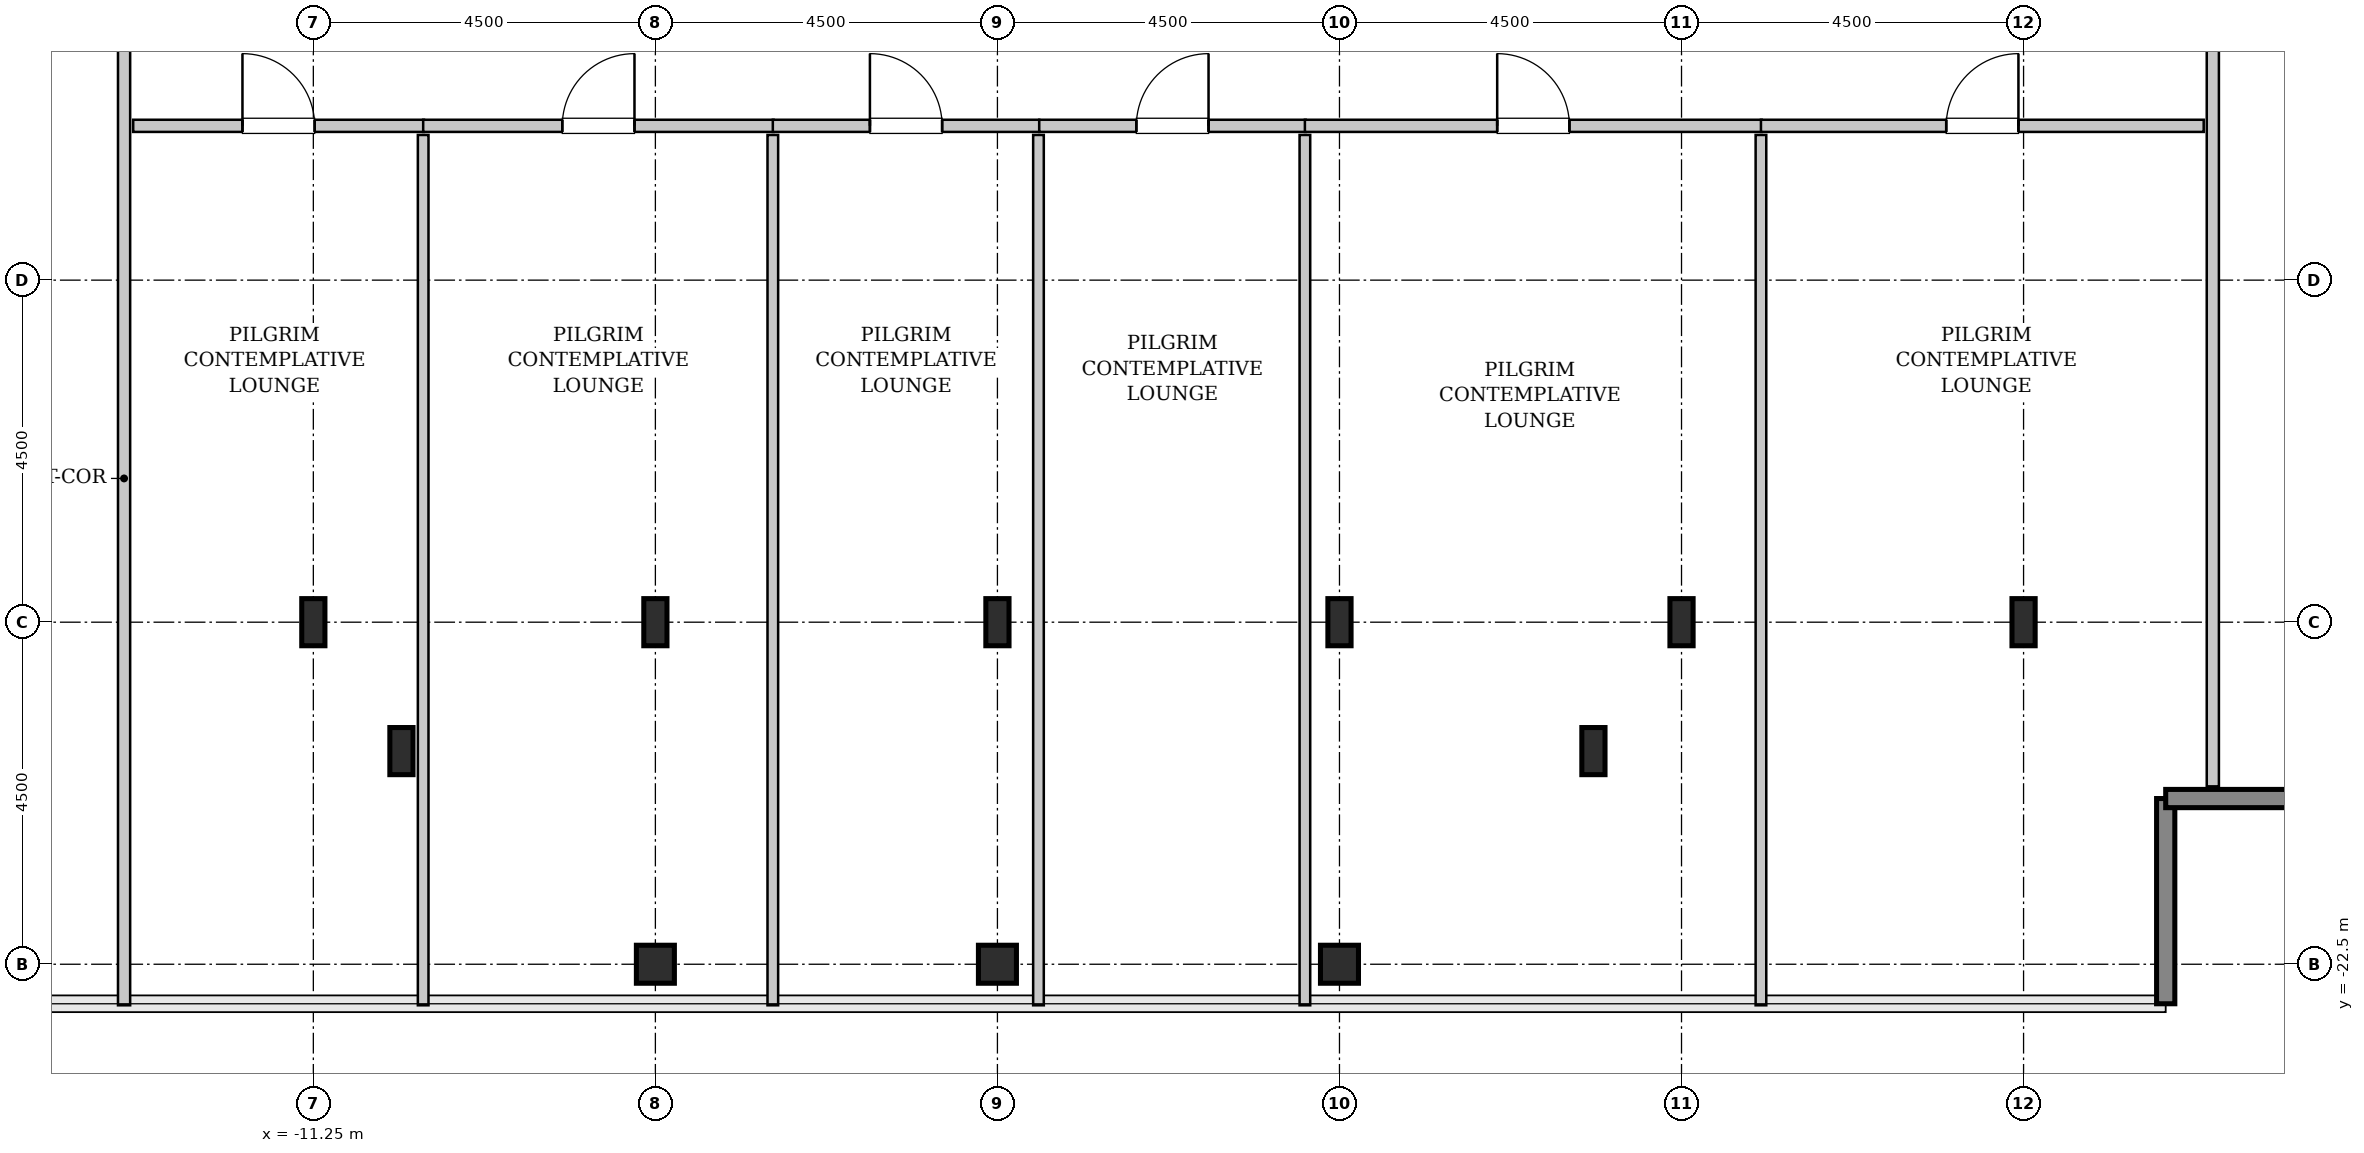
"""IFC4 building model, lengths in metres.
Left out: names, types, materials, properties, quantities, classifications, styles, units other than length and angle.
Written with IfcOpenShell. Run it as: python <this file> out.ifc"""

import sys

from ifc_helpers import new_model, si_unit, direction, frame, frame_2d, origin, origin_2d, place, context, subcontext, project, spatial, rectangle, hollow_rectangle, i_section, extrude, source, transform, mapped, element, fill, save


model = new_model("IFC4")
c1 = context("Model", 3, precision=1e-05, world=origin(), true_north=direction((0.0, 1.0)))
c2 = subcontext(c1, "Body", "Model", "MODEL_VIEW")
j1 = project(units=[si_unit("LENGTHUNIT", "METRE"), si_unit("PLANEANGLEUNIT", "RADIAN")], contexts=[c1])
p1 = place(None, origin())
s1 = spatial("IfcSite", under=j1, at=p1, CompositionType="ELEMENT")
p2 = place(p1, origin())
s2 = spatial("IfcBuilding", under=s1, at=p2, CompositionType="ELEMENT")
p3 = place(p2, frame((0.0, 0.0, 291.2)))
s3 = spatial("IfcBuildingStorey", under=s2, at=p3, CompositionType="ELEMENT", Elevation=291.2)
m1 = source(origin(), c2, "Body", "SweptSolid", [
    extrude(i_section(OverallWidth=0.305, OverallDepth=0.62, WebThickness=0.021, FlangeThickness=0.04, FilletRadius=0.027, at=origin_2d()), origin(), (0.0, 0.0, 1.0), 3.8),
])
for number, where, z_axis, x_axis in (
    (1, (-11.25, -18.0, 0.0), (0.0, 0.0, 1.0), (1.0, 0.0, 0.0)),
    (2, (-10.091, -19.696, 0.0), (0.0, 0.0, 1.0), (1.0, 0.0, 0.0)),
):
    element("IfcColumn", number, at=place(p3, frame(where, z_axis=z_axis, x_axis=x_axis)), inside=s3, PredefinedType="COLUMN", context=c2, shape_type="MappedRepresentation", body=[
        mapped(m1, transform((0.0, 0.0, 0.0), x_axis=(1.0, 0.0, 0.0), y_axis=(0.0, 1.0, 0.0), z_axis=(0.0, 0.0, 1.0), scale=1.0)),
    ])
m2 = source(origin(), c2, "Body", "SweptSolid", [
    extrude(hollow_rectangle(XDim=0.5, YDim=0.5, WallThickness=0.025, InnerFilletRadius=0.025, OuterFilletRadius=0.05, at=origin_2d()), origin(), (0.0, 0.0, 1.0), 3.8),
])
p4 = place(p3, frame((-6.75, -22.5, 0.0), z_axis=(0.0, 0.0, 1.0), x_axis=(1.0, 0.0, 0.0)))
e3 = element("IfcColumn", 3, at=p4, inside=s3, PredefinedType="COLUMN", context=c2, shape_type="MappedRepresentation", body=[
    mapped(m2, transform((0.0, 0.0, 0.0), x_axis=(1.0, 0.0, 0.0), y_axis=(0.0, 1.0, 0.0), z_axis=(0.0, 0.0, 1.0), scale=1.0)),
])
p5 = place(p3, frame((-6.75, -18.0, 0.0), z_axis=(0.0, 0.0, 1.0), x_axis=(1.0, 0.0, 0.0)))
e4 = element("IfcColumn", 4, at=p5, inside=s3, PredefinedType="COLUMN", context=c2, shape_type="MappedRepresentation", body=[
    mapped(m1, transform((0.0, 0.0, 0.0), x_axis=(1.0, 0.0, 0.0), y_axis=(0.0, 1.0, 0.0), z_axis=(0.0, 0.0, 1.0), scale=1.0)),
])
p6 = place(p3, frame((-2.25, -22.5, 0.0), z_axis=(0.0, 0.0, 1.0), x_axis=(1.0, 0.0, 0.0)))
e5 = element("IfcColumn", 5, at=p6, inside=s3, PredefinedType="COLUMN", context=c2, shape_type="MappedRepresentation", body=[
    mapped(m2, transform((0.0, 0.0, 0.0), x_axis=(1.0, 0.0, 0.0), y_axis=(0.0, 1.0, 0.0), z_axis=(0.0, 0.0, 1.0), scale=1.0)),
])
p7 = place(p3, frame((-2.25, -18.0, 0.0), z_axis=(0.0, 0.0, 1.0), x_axis=(1.0, 0.0, 0.0)))
e6 = element("IfcColumn", 6, at=p7, inside=s3, PredefinedType="COLUMN", context=c2, shape_type="MappedRepresentation", body=[
    mapped(m1, transform((0.0, 0.0, 0.0), x_axis=(1.0, 0.0, 0.0), y_axis=(0.0, 1.0, 0.0), z_axis=(0.0, 0.0, 1.0), scale=1.0)),
])
p8 = place(p3, frame((2.25, -22.5, 0.0), z_axis=(0.0, 0.0, 1.0), x_axis=(1.0, 0.0, 0.0)))
e7 = element("IfcColumn", 7, at=p8, inside=s3, PredefinedType="COLUMN", context=c2, shape_type="MappedRepresentation", body=[
    mapped(m2, transform((0.0, 0.0, 0.0), x_axis=(1.0, 0.0, 0.0), y_axis=(0.0, 1.0, 0.0), z_axis=(0.0, 0.0, 1.0), scale=1.0)),
])
for number, where, z_axis, x_axis in (
    (8, (2.25, -18.0, 0.0), (0.0, 0.0, 1.0), (1.0, 0.0, 0.0)),
    (9, (5.591, -19.696, 0.0), (0.0, 0.0, 1.0), (1.0, 0.0, 0.0)),
    (10, (6.75, -18.0, 0.0), (0.0, 0.0, 1.0), (1.0, 0.0, 0.0)),
    (11, (11.25, -18.0, 0.0), (0.0, 0.0, 1.0), (1.0, 0.0, 0.0)),
):
    element("IfcColumn", number, at=place(p3, frame(where, z_axis=z_axis, x_axis=x_axis)), inside=s3, PredefinedType="COLUMN", context=c2, shape_type="MappedRepresentation", body=[
        mapped(m1, transform((0.0, 0.0, 0.0), x_axis=(1.0, 0.0, 0.0), y_axis=(0.0, 1.0, 0.0), z_axis=(0.0, 0.0, 1.0), scale=1.0)),
    ])
m3 = source(origin(), c2, "Body", "SweptSolid", [
    extrude(rectangle(XDim=2.7, YDim=0.24, at=frame_2d((1.35, 0.0))), origin(), (0.0, 0.0, 1.0), 3.55),
])
for number, where, z_axis, x_axis in (
    (12, (13.12, -23.02, 0.0), (0.0, 0.0, 1.0), (0.0, 1.0, 0.0)),
    (13, (13.12, -20.32, 0.0), (0.0, 0.0, 1.0), (1.0, 0.0, 0.0)),
):
    element("IfcWall", number, at=place(p3, frame(where, z_axis=z_axis, x_axis=x_axis)), inside=s3, PredefinedType="SHEAR", context=c2, shape_type="MappedRepresentation", body=[
        mapped(m3, transform((0.0, 0.0, 0.0), x_axis=(1.0, 0.0, 0.0), y_axis=(0.0, 1.0, 0.0), z_axis=(0.0, 0.0, 1.0), scale=1.0)),
    ])
m4 = source(origin(), c2, "Body", "SweptSolid", [
    extrude(rectangle(XDim=17.045, YDim=0.16, at=frame_2d((8.522, 0.0))), origin(), (0.0, 0.0, 1.0), 3.535),
])
p9 = place(p3, frame((-13.74, -23.04, 0.0), z_axis=(0.0, 0.0, 1.0), x_axis=(0.0, 1.0, 0.0)))
e14 = element("IfcWall", 14, at=p9, inside=s3, PredefinedType="PARTITIONING", context=c2, shape_type="MappedRepresentation", body=[
    mapped(m4, transform((0.0, 0.0, 0.0), x_axis=(1.0, 0.0, 0.0), y_axis=(0.0, 1.0, 0.0), z_axis=(0.0, 0.0, 1.0), scale=1.0)),
])
p10 = place(p9, frame((13.812, 0.0, 0.0)))
e15 = element("IfcOpeningElement", 15, at=p10, cuts=e14, PredefinedType="OPENING", context=c2, shape_type="SweptSolid", body=[
    extrude(rectangle(XDim=0.95, YDim=2.1, at=frame_2d((0.475, 1.05))), frame((0.0, 0.09, 0.0), z_axis=(0.0, -1.0, 0.0), x_axis=(1.0, 0.0, 0.0)), (0.0, 0.0, 1.0), 0.18),
])
m5 = source(origin(), c2, "Body", "SweptSolid", [
    extrude(rectangle(XDim=11.665, YDim=0.16, at=frame_2d((5.833, 0.0))), origin(), (0.0, 0.0, 1.0), 3.535),
])
p11 = place(p3, frame((13.74, -20.16, 0.0), z_axis=(0.0, 0.0, 1.0), x_axis=(0.0, 1.0, 0.0)))
e16 = element("IfcWall", 16, at=p11, inside=s3, PredefinedType="PARTITIONING", context=c2, shape_type="MappedRepresentation", body=[
    mapped(m5, transform((0.0, 0.0, 0.0), x_axis=(1.0, 0.0, 0.0), y_axis=(0.0, 1.0, 0.0), z_axis=(0.0, 0.0, 1.0), scale=1.0)),
])
p12 = place(p11, frame((9.683, 0.0, 0.0)))
e17 = element("IfcOpeningElement", 17, at=p12, cuts=e16, PredefinedType="OPENING", context=c2, shape_type="SweptSolid", body=[
    extrude(rectangle(XDim=0.95, YDim=2.1, at=frame_2d((0.475, 1.05))), frame((0.0, 0.09, 0.0), z_axis=(0.0, -1.0, 0.0), x_axis=(1.0, 0.0, 0.0)), (0.0, 0.0, 1.0), 0.18),
])
m6 = source(origin(), c2, "Body", "SweptSolid", [
    extrude(rectangle(XDim=3.825, YDim=0.16, at=frame_2d((1.913, 0.0))), origin(), (0.0, 0.0, 1.0), 3.535),
])
p13 = place(p3, frame((-13.62, -11.47, 0.0), z_axis=(0.0, 0.0, 1.0), x_axis=(1.0, 0.0, 0.0)))
e18 = element("IfcWall", 18, at=p13, inside=s3, PredefinedType="PARTITIONING", context=c2, shape_type="MappedRepresentation", body=[
    mapped(m6, transform((0.0, 0.0, 0.0), x_axis=(1.0, 0.0, 0.0), y_axis=(0.0, 1.0, 0.0), z_axis=(0.0, 0.0, 1.0), scale=1.0)),
])
p14 = place(p13, frame((1.438, 0.0, 0.0)))
e19 = element("IfcOpeningElement", 19, at=p14, cuts=e18, PredefinedType="OPENING", context=c2, shape_type="SweptSolid", body=[
    extrude(rectangle(XDim=0.95, YDim=2.1, at=frame_2d((0.475, 1.05))), frame((0.0, 0.09, 0.0), z_axis=(0.0, -1.0, 0.0), x_axis=(1.0, 0.0, 0.0)), (0.0, 0.0, 1.0), 0.18),
])
m7 = source(origin(), c2, "Body", "SweptSolid", [
    extrude(rectangle(XDim=11.45, YDim=0.14, at=frame_2d((5.725, 0.0))), origin(), (0.0, 0.0, 1.0), 3.535),
])
p15 = place(p3, frame((-9.805, -23.04, 0.0), z_axis=(0.0, 0.0, 1.0), x_axis=(0.0, 1.0, 0.0)))
e20 = element("IfcWall", 20, at=p15, inside=s3, PredefinedType="PARTITIONING", context=c2, shape_type="MappedRepresentation", body=[
    mapped(m7, transform((0.0, 0.0, 0.0), x_axis=(1.0, 0.0, 0.0), y_axis=(0.0, 1.0, 0.0), z_axis=(0.0, 0.0, 1.0), scale=1.0)),
])
m8 = source(origin(), c2, "Body", "SweptSolid", [
    extrude(rectangle(XDim=4.61, YDim=0.16, at=frame_2d((2.305, 0.0))), origin(), (0.0, 0.0, 1.0), 3.535),
])
p16 = place(p3, frame((-9.805, -11.47, 0.0), z_axis=(0.0, 0.0, 1.0), x_axis=(1.0, 0.0, 0.0)))
e21 = element("IfcWall", 21, at=p16, inside=s3, PredefinedType="PARTITIONING", context=c2, shape_type="MappedRepresentation", body=[
    mapped(m8, transform((0.0, 0.0, 0.0), x_axis=(1.0, 0.0, 0.0), y_axis=(0.0, 1.0, 0.0), z_axis=(0.0, 0.0, 1.0), scale=1.0)),
])
p17 = place(p16, frame((1.83, 0.0, 0.0)))
e22 = element("IfcOpeningElement", 22, at=p17, cuts=e21, PredefinedType="OPENING", context=c2, shape_type="SweptSolid", body=[
    extrude(rectangle(XDim=0.95, YDim=2.1, at=frame_2d((0.475, 1.05))), frame((0.0, 0.09, 0.0), z_axis=(0.0, -1.0, 0.0), x_axis=(1.0, 0.0, 0.0)), (0.0, 0.0, 1.0), 0.18),
])
p18 = place(p3, frame((-5.205, -23.04, 0.0), z_axis=(0.0, 0.0, 1.0), x_axis=(0.0, 1.0, 0.0)))
e23 = element("IfcWall", 23, at=p18, inside=s3, PredefinedType="PARTITIONING", context=c2, shape_type="MappedRepresentation", body=[
    mapped(m7, transform((0.0, 0.0, 0.0), x_axis=(1.0, 0.0, 0.0), y_axis=(0.0, 1.0, 0.0), z_axis=(0.0, 0.0, 1.0), scale=1.0)),
])
m9 = source(origin(), c2, "Body", "SweptSolid", [
    extrude(rectangle(XDim=3.505, YDim=0.16, at=frame_2d((1.752, 0.0))), origin(), (0.0, 0.0, 1.0), 3.535),
])
p19 = place(p3, frame((-5.205, -11.47, 0.0), z_axis=(0.0, 0.0, 1.0), x_axis=(1.0, 0.0, 0.0)))
e24 = element("IfcWall", 24, at=p19, inside=s3, PredefinedType="PARTITIONING", context=c2, shape_type="MappedRepresentation", body=[
    mapped(m9, transform((0.0, 0.0, 0.0), x_axis=(1.0, 0.0, 0.0), y_axis=(0.0, 1.0, 0.0), z_axis=(0.0, 0.0, 1.0), scale=1.0)),
])
p20 = place(p19, frame((1.278, 0.0, 0.0)))
e25 = element("IfcOpeningElement", 25, at=p20, cuts=e24, PredefinedType="OPENING", context=c2, shape_type="SweptSolid", body=[
    extrude(rectangle(XDim=0.95, YDim=2.1, at=frame_2d((0.475, 1.05))), frame((0.0, 0.09, 0.0), z_axis=(0.0, -1.0, 0.0), x_axis=(1.0, 0.0, 0.0)), (0.0, 0.0, 1.0), 0.18),
])
p21 = place(p3, frame((-1.71, -23.04, 0.0), z_axis=(0.0, 0.0, 1.0), x_axis=(0.0, 1.0, 0.0)))
e26 = element("IfcWall", 26, at=p21, inside=s3, PredefinedType="PARTITIONING", context=c2, shape_type="MappedRepresentation", body=[
    mapped(m7, transform((0.0, 0.0, 0.0), x_axis=(1.0, 0.0, 0.0), y_axis=(0.0, 1.0, 0.0), z_axis=(0.0, 0.0, 1.0), scale=1.0)),
])
m10 = source(origin(), c2, "Body", "SweptSolid", [
    extrude(rectangle(XDim=3.505, YDim=0.16, at=frame_2d((1.752, 0.0))), origin(), (0.0, 0.0, 1.0), 3.535),
])
p22 = place(p3, frame((-1.7, -11.47, 0.0), z_axis=(0.0, 0.0, 1.0), x_axis=(1.0, 0.0, 0.0)))
e27 = element("IfcWall", 27, at=p22, inside=s3, PredefinedType="PARTITIONING", context=c2, shape_type="MappedRepresentation", body=[
    mapped(m10, transform((0.0, 0.0, 0.0), x_axis=(1.0, 0.0, 0.0), y_axis=(0.0, 1.0, 0.0), z_axis=(0.0, 0.0, 1.0), scale=1.0)),
])
p23 = place(p22, frame((1.278, 0.0, 0.0)))
e28 = element("IfcOpeningElement", 28, at=p23, cuts=e27, PredefinedType="OPENING", context=c2, shape_type="SweptSolid", body=[
    extrude(rectangle(XDim=0.95, YDim=2.1, at=frame_2d((0.475, 1.05))), frame((0.0, 0.09, 0.0), z_axis=(0.0, -1.0, 0.0), x_axis=(1.0, 0.0, 0.0)), (0.0, 0.0, 1.0), 0.18),
])
m11 = source(origin(), c2, "Body", "SweptSolid", [
    extrude(rectangle(XDim=11.45, YDim=0.14, at=frame_2d((5.725, 0.0))), origin(), (0.0, 0.0, 1.0), 2.925),
])
p24 = place(p3, frame((1.795, -23.04, 0.0), z_axis=(0.0, 0.0, 1.0), x_axis=(0.0, 1.0, 0.0)))
e29 = element("IfcWall", 29, at=p24, inside=s3, PredefinedType="PARTITIONING", context=c2, shape_type="MappedRepresentation", body=[
    mapped(m11, transform((0.0, 0.0, 0.0), x_axis=(1.0, 0.0, 0.0), y_axis=(0.0, 1.0, 0.0), z_axis=(0.0, 0.0, 1.0), scale=1.0)),
])
m12 = source(origin(), c2, "Body", "SweptSolid", [
    extrude(rectangle(XDim=6.01, YDim=0.16, at=frame_2d((3.005, 0.0))), origin(), (0.0, 0.0, 1.0), 3.535),
])
p25 = place(p3, frame((1.795, -11.47, 0.0), z_axis=(0.0, 0.0, 1.0), x_axis=(1.0, 0.0, 0.0)))
e30 = element("IfcWall", 30, at=p25, inside=s3, PredefinedType="PARTITIONING", context=c2, shape_type="MappedRepresentation", body=[
    mapped(m12, transform((0.0, 0.0, 0.0), x_axis=(1.0, 0.0, 0.0), y_axis=(0.0, 1.0, 0.0), z_axis=(0.0, 0.0, 1.0), scale=1.0)),
])
p26 = place(p25, frame((2.53, 0.0, 0.0)))
e31 = element("IfcOpeningElement", 31, at=p26, cuts=e30, PredefinedType="OPENING", context=c2, shape_type="SweptSolid", body=[
    extrude(rectangle(XDim=0.95, YDim=2.1, at=frame_2d((0.475, 1.05))), frame((0.0, 0.09, 0.0), z_axis=(0.0, -1.0, 0.0), x_axis=(1.0, 0.0, 0.0)), (0.0, 0.0, 1.0), 0.18),
])
p27 = place(p3, frame((7.795, -23.04, 0.0), z_axis=(0.0, 0.0, 1.0), x_axis=(0.0, 1.0, 0.0)))
e32 = element("IfcWall", 32, at=p27, inside=s3, PredefinedType="PARTITIONING", context=c2, shape_type="MappedRepresentation", body=[
    mapped(m7, transform((0.0, 0.0, 0.0), x_axis=(1.0, 0.0, 0.0), y_axis=(0.0, 1.0, 0.0), z_axis=(0.0, 0.0, 1.0), scale=1.0)),
])
m13 = source(origin(), c2, "Body", "SweptSolid", [
    extrude(rectangle(XDim=5.825, YDim=0.16, at=frame_2d((2.913, 0.0))), origin(), (0.0, 0.0, 1.0), 3.535),
])
p28 = place(p3, frame((7.795, -11.47, 0.0), z_axis=(0.0, 0.0, 1.0), x_axis=(1.0, 0.0, 0.0)))
e33 = element("IfcWall", 33, at=p28, inside=s3, PredefinedType="PARTITIONING", context=c2, shape_type="MappedRepresentation", body=[
    mapped(m13, transform((0.0, 0.0, 0.0), x_axis=(1.0, 0.0, 0.0), y_axis=(0.0, 1.0, 0.0), z_axis=(0.0, 0.0, 1.0), scale=1.0)),
])
p29 = place(p28, frame((2.438, 0.0, 0.0)))
e34 = element("IfcOpeningElement", 34, at=p29, cuts=e33, PredefinedType="OPENING", context=c2, shape_type="SweptSolid", body=[
    extrude(rectangle(XDim=0.95, YDim=2.1, at=frame_2d((0.475, 1.05))), frame((0.0, 0.09, 0.0), z_axis=(0.0, -1.0, 0.0), x_axis=(1.0, 0.0, 0.0)), (0.0, 0.0, 1.0), 0.18),
])
m14 = source(origin(), c2, "Body", "SweptSolid", [
    extrude(rectangle(XDim=0.95, YDim=2.1, at=frame_2d((0.475, 1.05))), frame((0.0, 0.025, 0.0), z_axis=(0.0, -1.0, 0.0), x_axis=(1.0, 0.0, 0.0)), (0.0, 0.0, 1.0), 0.05),
])
p30 = place(p14, origin())
e35 = element("IfcDoor", 35, at=p30, inside=s3, OperationType="SINGLE_SWING_LEFT", PredefinedType="DOOR", context=c2, shape_type="MappedRepresentation", body=[
    mapped(m14, transform((0.0, 0.0, 0.0), x_axis=(1.0, 0.0, 0.0), y_axis=(0.0, 1.0, 0.0), z_axis=(0.0, 0.0, 1.0), scale=1.0)),
])
fill(e19, e35)
p31 = place(p17, origin())
e36 = element("IfcDoor", 36, at=p31, inside=s3, OperationType="SINGLE_SWING_RIGHT", PredefinedType="DOOR", context=c2, shape_type="MappedRepresentation", body=[
    mapped(m14, transform((0.0, 0.0, 0.0), x_axis=(1.0, 0.0, 0.0), y_axis=(0.0, 1.0, 0.0), z_axis=(0.0, 0.0, 1.0), scale=1.0)),
])
fill(e22, e36)
p32 = place(p20, origin())
e37 = element("IfcDoor", 37, at=p32, inside=s3, OperationType="SINGLE_SWING_LEFT", PredefinedType="DOOR", context=c2, shape_type="MappedRepresentation", body=[
    mapped(m14, transform((0.0, 0.0, 0.0), x_axis=(1.0, 0.0, 0.0), y_axis=(0.0, 1.0, 0.0), z_axis=(0.0, 0.0, 1.0), scale=1.0)),
])
fill(e25, e37)
p33 = place(p23, origin())
e38 = element("IfcDoor", 38, at=p33, inside=s3, OperationType="SINGLE_SWING_RIGHT", PredefinedType="DOOR", context=c2, shape_type="MappedRepresentation", body=[
    mapped(m14, transform((0.0, 0.0, 0.0), x_axis=(1.0, 0.0, 0.0), y_axis=(0.0, 1.0, 0.0), z_axis=(0.0, 0.0, 1.0), scale=1.0)),
])
fill(e28, e38)
p34 = place(p26, origin())
e39 = element("IfcDoor", 39, at=p34, inside=s3, OperationType="SINGLE_SWING_LEFT", PredefinedType="DOOR", context=c2, shape_type="MappedRepresentation", body=[
    mapped(m14, transform((0.0, 0.0, 0.0), x_axis=(1.0, 0.0, 0.0), y_axis=(0.0, 1.0, 0.0), z_axis=(0.0, 0.0, 1.0), scale=1.0)),
])
fill(e31, e39)
p35 = place(p29, origin())
e40 = element("IfcDoor", 40, at=p35, inside=s3, OperationType="SINGLE_SWING_RIGHT", PredefinedType="DOOR", context=c2, shape_type="MappedRepresentation", body=[
    mapped(m14, transform((0.0, 0.0, 0.0), x_axis=(1.0, 0.0, 0.0), y_axis=(0.0, 1.0, 0.0), z_axis=(0.0, 0.0, 1.0), scale=1.0)),
])
fill(e34, e40)
save(model, sys.argv[1])
